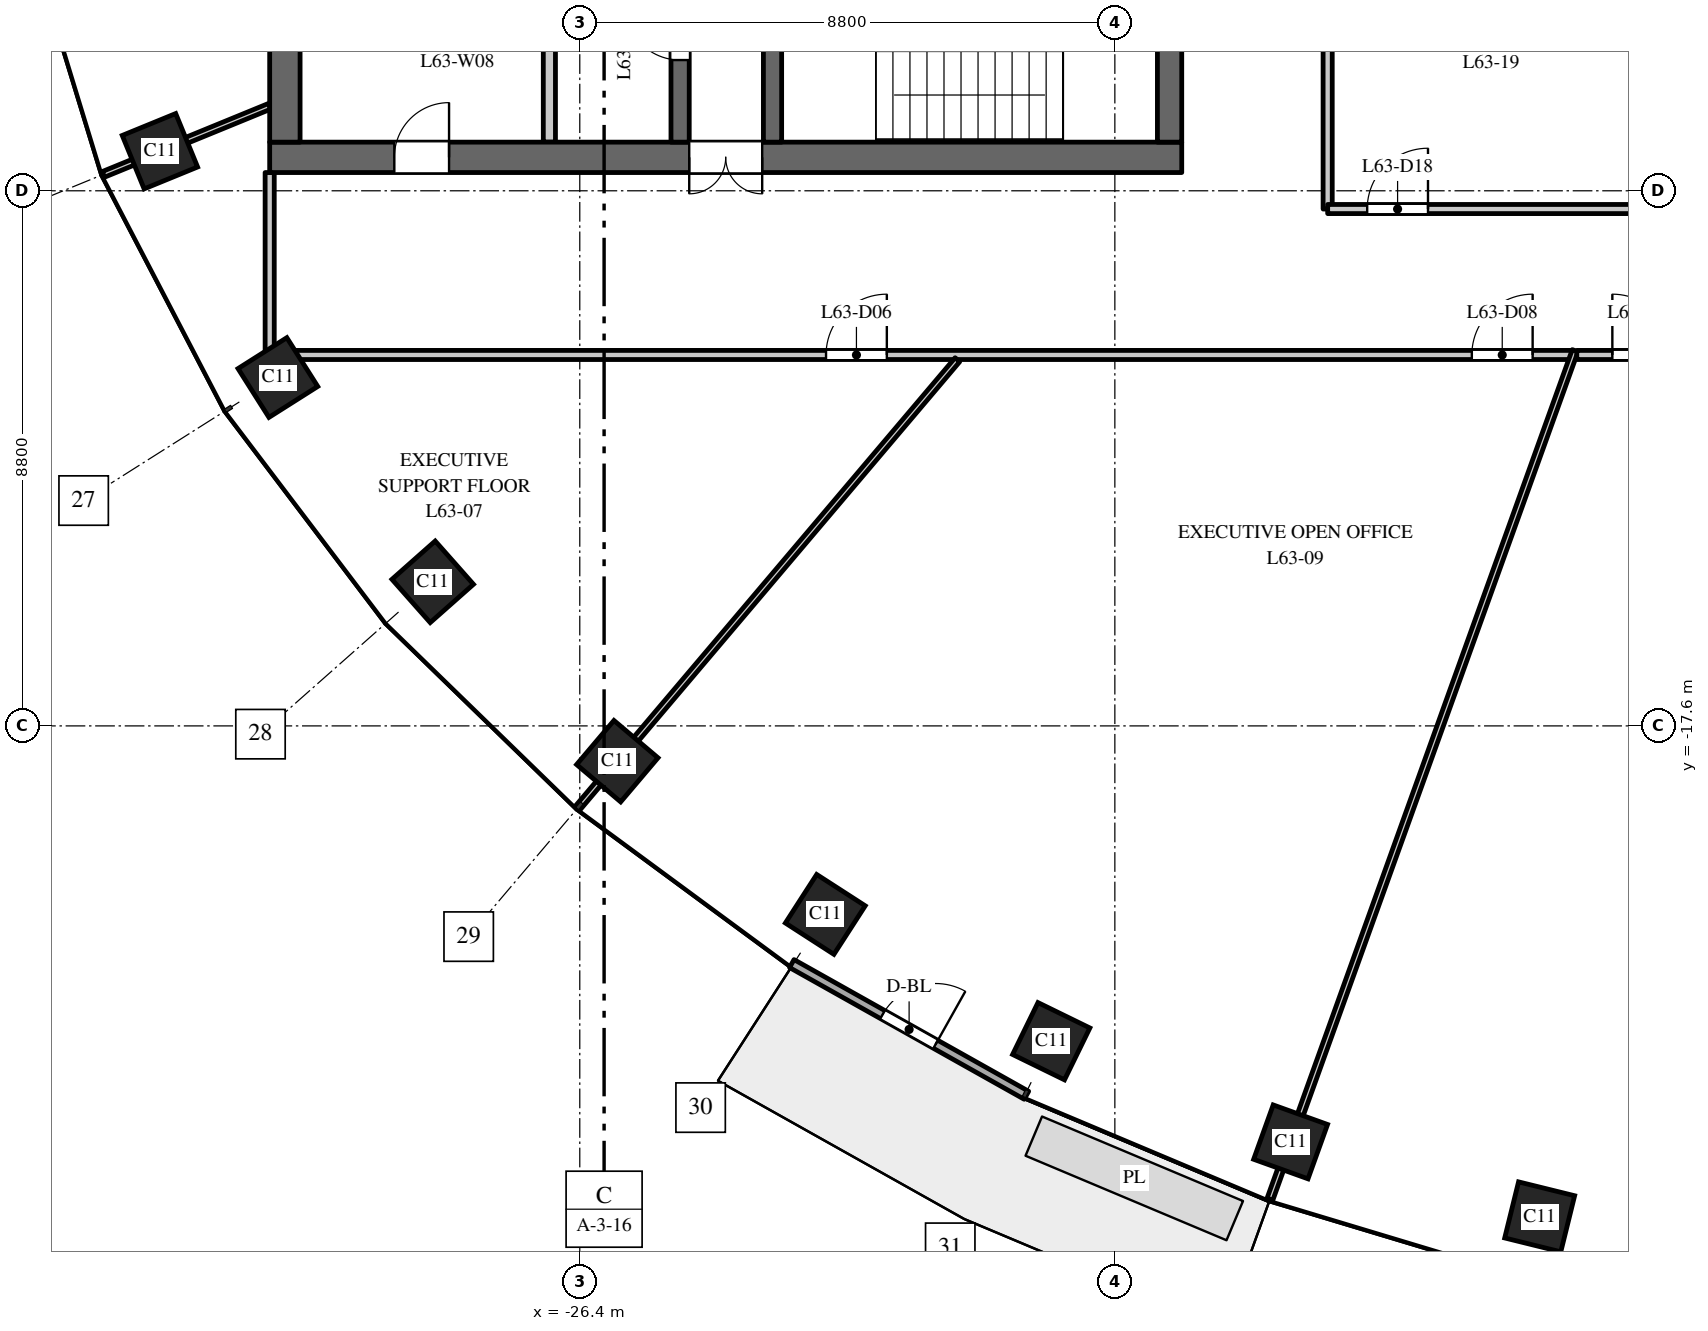
"""IFC4 building model, lengths in metres.
Left out: names, types, materials, properties, quantities, classifications, styles, units other than length and angle.
Written with IfcOpenShell. Run it as: python <this file> out.ifc"""

import sys

from ifc_helpers import new_model, si_unit, direction, frame, frame_2d, origin, origin_2d, place, context, subcontext, project, spatial, rectangle, extrude, element, fill, save


model = new_model("IFC4")
c1 = context("Model", 3, precision=1e-05, world=origin(), true_north=direction((0.0, 1.0)))
c2 = subcontext(c1, "Body", "Model", "MODEL_VIEW")
j1 = project(units=[si_unit("LENGTHUNIT", "METRE"), si_unit("PLANEANGLEUNIT", "RADIAN")], contexts=[c1])
p1 = place(None, origin())
s1 = spatial("IfcSite", under=j1, at=p1, CompositionType="ELEMENT")
p2 = place(p1, origin())
s2 = spatial("IfcBuilding", under=s1, at=p2, CompositionType="ELEMENT")
p3 = place(p2, frame((0.0, 0.0, 295.0)))
s3 = spatial("IfcBuildingStorey", under=s2, at=p3, CompositionType="ELEMENT", Elevation=295.0)
for number, where, z_axis, x_axis in (
    (1, (-33.305, -8.149, 0.0), (0.0, 0.0, 1.0), (0.379, -0.925, 0.0)),
    (2, (-31.365, -11.871, 0.0), (0.0, 0.0, 1.0), (0.535, -0.845, 0.0)),
    (3, (-28.819, -15.23, 0.0), (0.0, 0.0, 1.0), (0.663, -0.749, 0.0)),
    (4, (-25.783, -18.18, 0.0), (0.0, 0.0, 1.0), (0.763, -0.646, 0.0)),
    (5, (-22.362, -20.7, 0.0), (0.0, 0.0, 1.0), (0.84, -0.542, 0.0)),
    (6, (-18.646, -22.785, 0.0), (0.0, 0.0, 1.0), (0.898, -0.439, 0.0)),
    (7, (-14.709, -24.441, 0.0), (0.0, 0.0, 1.0), (0.941, -0.338, 0.0)),
    (8, (-10.613, -25.674, 0.0), (0.0, 0.0, 1.0), (0.971, -0.24, 0.0)),
):
    element("IfcColumn", number, at=place(p3, frame(where, z_axis=z_axis, x_axis=x_axis)), inside=s3, PredefinedType="COLUMN", context=c2, shape_type="SweptSolid", body=[
        extrude(rectangle(XDim=0.95, YDim=0.95, at=origin_2d()), origin(), (0.0, 0.0, 1.0), 4.0),
    ])
p4 = place(p3, frame((-16.5, -8.25, 0.0), z_axis=(0.0, 0.0, 1.0), x_axis=(-1.0, 0.0, 0.0)))
e9 = element("IfcWall", 9, at=p4, inside=s3, PredefinedType="SHEAR", context=c2, shape_type="SweptSolid", body=[
    extrude(rectangle(XDim=15.0, YDim=0.5, at=frame_2d((7.5, 0.0))), origin(), (0.0, 0.0, 1.0), 3.7),
])
p5 = place(p4, frame((6.9, 0.0, 0.0)))
e10 = element("IfcOpeningElement", 10, at=p5, cuts=e9, PredefinedType="OPENING", context=c2, shape_type="SweptSolid", body=[
    extrude(rectangle(XDim=1.2, YDim=2.1, at=frame_2d((0.6, 1.05))), frame((0.0, 0.26, 0.0), z_axis=(0.0, -1.0, 0.0), x_axis=(1.0, 0.0, 0.0)), (0.0, 0.0, 1.0), 0.52),
])
p6 = place(p4, frame((12.05, 0.0, 0.0)))
e11 = element("IfcOpeningElement", 11, at=p6, cuts=e9, PredefinedType="OPENING", context=c2, shape_type="SweptSolid", body=[
    extrude(rectangle(XDim=0.9, YDim=2.1, at=frame_2d((0.45, 1.05))), frame((0.0, 0.26, 0.0), z_axis=(0.0, -1.0, 0.0), x_axis=(1.0, 0.0, 0.0)), (0.0, 0.0, 1.0), 0.52),
])
p7 = place(p3, frame((-24.75, -8.0, 0.0), z_axis=(0.0, 0.0, 1.0), x_axis=(0.0, 1.0, 0.0)))
e12 = element("IfcWall", 12, at=p7, inside=s3, PredefinedType="SHEAR", context=c2, shape_type="SweptSolid", body=[
    extrude(rectangle(XDim=16.0, YDim=0.3, at=frame_2d((8.0, 0.0))), origin(), (0.0, 0.0, 1.0), 3.7),
])
p8 = place(p7, frame((4.425, 0.0, 0.0)))
e13 = element("IfcOpeningElement", 13, at=p8, cuts=e12, PredefinedType="OPENING", context=c2, shape_type="SweptSolid", body=[
    extrude(rectangle(XDim=1.1, YDim=2.1, at=frame_2d((0.55, 1.05))), frame((0.0, 0.16, 0.0), z_axis=(0.0, -1.0, 0.0), x_axis=(1.0, 0.0, 0.0)), (0.0, 0.0, 1.0), 0.32),
])
p9 = place(p7, frame((7.45, 0.0, 0.0)))
e14 = element("IfcOpeningElement", 14, at=p9, cuts=e12, PredefinedType="OPENING", context=c2, shape_type="SweptSolid", body=[
    extrude(rectangle(XDim=1.1, YDim=2.1, at=frame_2d((0.55, 1.05))), frame((0.0, 0.16, 0.0), z_axis=(0.0, -1.0, 0.0), x_axis=(1.0, 0.0, 0.0)), (0.0, 0.0, 1.0), 0.32),
])
p10 = place(p7, frame((10.575, 0.0, 0.0)))
e15 = element("IfcOpeningElement", 15, at=p10, cuts=e12, PredefinedType="OPENING", context=c2, shape_type="SweptSolid", body=[
    extrude(rectangle(XDim=0.9, YDim=2.1, at=frame_2d((0.45, 1.05))), frame((0.0, 0.16, 0.0), z_axis=(0.0, -1.0, 0.0), x_axis=(1.0, 0.0, 0.0)), (0.0, 0.0, 1.0), 0.32),
])
p11 = place(p7, frame((13.75, 0.0, 0.0)))
e16 = element("IfcOpeningElement", 16, at=p11, cuts=e12, PredefinedType="OPENING", context=c2, shape_type="SweptSolid", body=[
    extrude(rectangle(XDim=0.9, YDim=2.1, at=frame_2d((0.45, 1.05))), frame((0.0, 0.16, 0.0), z_axis=(0.0, -1.0, 0.0), x_axis=(1.0, 0.0, 0.0)), (0.0, 0.0, 1.0), 0.32),
])
p12 = place(p7, frame((1.35, 0.0, 0.0)))
e17 = element("IfcOpeningElement", 17, at=p12, cuts=e12, PredefinedType="OPENING", context=c2, shape_type="SweptSolid", body=[
    extrude(rectangle(XDim=0.9, YDim=2.1, at=frame_2d((0.45, 1.05))), frame((0.0, 0.16, 0.0), z_axis=(0.0, -1.0, 0.0), x_axis=(1.0, 0.0, 0.0)), (0.0, 0.0, 1.0), 0.32),
])
p13 = place(p3, frame((-16.7, -8.0, 0.0), z_axis=(0.0, 0.0, 1.0), x_axis=(0.0, 1.0, 0.0)))
e18 = element("IfcWall", 18, at=p13, inside=s3, PredefinedType="SHEAR", context=c2, shape_type="SweptSolid", body=[
    extrude(rectangle(XDim=16.0, YDim=0.4, at=frame_2d((8.0, 0.0))), origin(), (0.0, 0.0, 1.0), 3.7),
])
p14 = place(p3, frame((-31.25, -8.0, 0.0), z_axis=(0.0, 0.0, 1.0), x_axis=(0.0, 1.0, 0.0)))
e19 = element("IfcWall", 19, at=p14, inside=s3, PredefinedType="SHEAR", context=c2, shape_type="SweptSolid", body=[
    extrude(rectangle(XDim=16.0, YDim=0.5, at=frame_2d((8.0, 0.0))), origin(), (0.0, 0.0, 1.0), 3.7),
])
p15 = place(p3, frame((-26.9, -8.0, 0.0), z_axis=(0.0, 0.0, 1.0), x_axis=(0.0, 1.0, 0.0)))
e20 = element("IfcWall", 20, at=p15, inside=s3, PredefinedType="PARTITIONING", context=c2, shape_type="SweptSolid", body=[
    extrude(rectangle(XDim=3.25, YDim=0.2, at=frame_2d((1.625, 0.0))), origin(), (0.0, 0.0, 1.0), 3.7),
])
p16 = place(p3, frame((-23.23, -8.0, 0.0), z_axis=(0.0, 0.0, 1.0), x_axis=(0.0, 1.0, 0.0)))
e21 = element("IfcWall", 21, at=p16, inside=s3, PredefinedType="SHEAR", context=c2, shape_type="SweptSolid", body=[
    extrude(rectangle(XDim=7.875, YDim=0.3, at=frame_2d((3.938, 0.0))), origin(), (0.0, 0.0, 1.0), 3.7),
])
p17 = place(p16, frame((5.15, 0.0, 0.0)))
e22 = element("IfcOpeningElement", 22, at=p17, cuts=e21, PredefinedType="OPENING", context=c2, shape_type="SweptSolid", body=[
    extrude(rectangle(XDim=1.1, YDim=2.1, at=frame_2d((0.55, 1.05))), frame((0.0, 0.16, 0.0), z_axis=(0.0, -1.0, 0.0), x_axis=(1.0, 0.0, 0.0)), (0.0, 0.0, 1.0), 0.32),
])
p18 = place(p3, frame((-22.913, -21.509, 0.0), z_axis=(0.0, 0.0, 1.0), x_axis=(0.872046572975, -0.489422899509, 0.0)))
e23 = element("IfcWall", 23, at=p18, inside=s3, PredefinedType="STANDARD", context=c2, shape_type="SweptSolid", body=[
    extrude(rectangle(XDim=4.426, YDim=0.15, at=frame_2d((2.213, 0.0))), origin(), (0.0, 0.0, 1.0), 3.7),
])
p19 = place(p18, frame((1.713, 0.0, 0.0)))
e24 = element("IfcOpeningElement", 24, at=p19, cuts=e23, PredefinedType="OPENING", context=c2, shape_type="SweptSolid", body=[
    extrude(rectangle(XDim=1.0, YDim=2.4, at=frame_2d((0.5, 1.2))), frame((0.0, 0.085, 0.0), z_axis=(0.0, -1.0, 0.0), x_axis=(1.0, 0.0, 0.0)), (0.0, 0.0, 1.0), 0.17),
])
p20 = place(p3, frame((-34.234, -8.53, 0.0), z_axis=(0.0, 0.0, 1.0), x_axis=(0.925344112436, 0.379128307542, 0.0)))
e25 = element("IfcWall", 25, at=p20, inside=s3, PredefinedType="PARTITIONING", context=c2, shape_type="SweptSolid", body=[
    extrude(rectangle(XDim=2.954, YDim=0.1, at=frame_2d((1.477, 0.0))), origin(), (0.0, 0.0, 1.0), 3.0),
])
p21 = place(p3, frame((-31.5, -11.5, 0.0), z_axis=(0.0, 0.0, 1.0), x_axis=(0.0, 1.0, 0.0)))
e26 = element("IfcWall", 26, at=p21, inside=s3, PredefinedType="PARTITIONING", context=c2, shape_type="SweptSolid", body=[
    extrude(rectangle(XDim=3.0, YDim=0.15, at=frame_2d((1.5, 0.0))), origin(), (0.0, 0.0, 1.0), 3.0),
])
p22 = place(p3, frame((-31.5, -11.5, 0.0), z_axis=(0.0, 0.0, 1.0), x_axis=(1.0, 0.0, 0.0)))
e27 = element("IfcWall", 27, at=p22, inside=s3, PredefinedType="PARTITIONING", context=c2, shape_type="SweptSolid", body=[
    extrude(rectangle(XDim=21.432, YDim=0.15, at=frame_2d((10.716, 0.0))), origin(), (0.0, 0.0, 1.0), 2.75),
])
p23 = place(p22, frame((9.15, 0.0, 0.0)))
e28 = element("IfcOpeningElement", 28, at=p23, cuts=e27, PredefinedType="OPENING", context=c2, shape_type="SweptSolid", body=[
    extrude(rectangle(XDim=1.0, YDim=2.1, at=frame_2d((0.5, 1.05))), frame((0.0, 0.085, 0.0), z_axis=(0.0, -1.0, 0.0), x_axis=(1.0, 0.0, 0.0)), (0.0, 0.0, 1.0), 0.17),
])
p24 = place(p22, frame((19.771, 0.0, 0.0)))
e29 = element("IfcOpeningElement", 29, at=p24, cuts=e27, PredefinedType="OPENING", context=c2, shape_type="SweptSolid", body=[
    extrude(rectangle(XDim=1.0, YDim=2.1, at=frame_2d((0.5, 1.05))), frame((0.0, 0.085, 0.0), z_axis=(0.0, -1.0, 0.0), x_axis=(1.0, 0.0, 0.0)), (0.0, 0.0, 1.0), 0.17),
])
p25 = place(p3, frame((-26.43, -18.945, 0.0), z_axis=(0.0, 0.0, 1.0), x_axis=(0.646376264927, 0.763018822926, 0.0)))
e30 = element("IfcWall", 30, at=p25, inside=s3, PredefinedType="PARTITIONING", context=c2, shape_type="SweptSolid", body=[
    extrude(rectangle(XDim=9.655, YDim=0.1, at=frame_2d((4.828, 0.0))), origin(), (0.0, 0.0, 1.0), 2.75),
])
p26 = place(p3, frame((-15.049, -25.383, 0.0), z_axis=(0.0, 0.0, 1.0), x_axis=(0.338454781071, 0.94098265721, 0.0)))
e31 = element("IfcWall", 31, at=p26, inside=s3, PredefinedType="PARTITIONING", context=c2, shape_type="SweptSolid", body=[
    extrude(rectangle(XDim=14.829, YDim=0.1, at=frame_2d((7.415, 0.0))), origin(), (0.0, 0.0, 1.0), 2.75),
])
p27 = place(p3, frame((-14.1, -9.1, 0.0), z_axis=(0.0, 0.0, 1.0), x_axis=(0.0, 1.0, 0.0)))
e32 = element("IfcWall", 32, at=p27, inside=s3, PredefinedType="PARTITIONING", context=c2, shape_type="SweptSolid", body=[
    extrude(rectangle(XDim=18.2, YDim=0.15, at=frame_2d((9.1, 0.0))), origin(), (0.0, 0.0, 1.0), 3.7),
])
p28 = place(p27, frame((5.655, 0.0, 0.0)))
e33 = element("IfcOpeningElement", 33, at=p28, cuts=e32, PredefinedType="OPENING", context=c2, shape_type="SweptSolid", body=[
    extrude(rectangle(XDim=1.0, YDim=2.1, at=frame_2d((0.5, 1.05))), frame((0.0, 0.085, 0.0), z_axis=(0.0, -1.0, 0.0), x_axis=(1.0, 0.0, 0.0)), (0.0, 0.0, 1.0), 0.17),
])
p29 = place(p27, frame((12.455, 0.0, 0.0)))
e34 = element("IfcOpeningElement", 34, at=p29, cuts=e32, PredefinedType="OPENING", context=c2, shape_type="SweptSolid", body=[
    extrude(rectangle(XDim=1.0, YDim=2.1, at=frame_2d((0.5, 1.05))), frame((0.0, 0.085, 0.0), z_axis=(0.0, -1.0, 0.0), x_axis=(1.0, 0.0, 0.0)), (0.0, 0.0, 1.0), 0.17),
])
p30 = place(p3, frame((-14.1, -9.1, 0.0), z_axis=(0.0, 0.0, 1.0), x_axis=(1.0, 0.0, 0.0)))
e35 = element("IfcWall", 35, at=p30, inside=s3, PredefinedType="PARTITIONING", context=c2, shape_type="SweptSolid", body=[
    extrude(rectangle(XDim=12.3, YDim=0.15, at=frame_2d((6.15, 0.0))), origin(), (0.0, 0.0, 1.0), 2.75),
])
p31 = place(p30, frame((0.65, 0.0, 0.0)))
e36 = element("IfcOpeningElement", 36, at=p31, cuts=e35, PredefinedType="OPENING", context=c2, shape_type="SweptSolid", body=[
    extrude(rectangle(XDim=1.0, YDim=2.1, at=frame_2d((0.5, 1.05))), frame((0.0, 0.085, 0.0), z_axis=(0.0, -1.0, 0.0), x_axis=(1.0, 0.0, 0.0)), (0.0, 0.0, 1.0), 0.17),
])
p32 = place(p3, frame((-10.003, -11.5, 0.0), z_axis=(0.0, 0.0, 1.0), x_axis=(1.0, 0.0, 0.0)))
e37 = element("IfcWall", 37, at=p32, inside=s3, PredefinedType="PARTITIONING", context=c2, shape_type="SweptSolid", body=[
    extrude(rectangle(XDim=9.086, YDim=0.15, at=frame_2d((4.543, 0.0))), origin(), (0.0, 0.0, 1.0), 2.75),
])
p33 = place(p32, frame((0.585, 0.0, 0.0)))
e38 = element("IfcOpeningElement", 38, at=p33, cuts=e37, PredefinedType="OPENING", context=c2, shape_type="SweptSolid", body=[
    extrude(rectangle(XDim=1.0, YDim=2.1, at=frame_2d((0.5, 1.05))), frame((0.0, 0.085, 0.0), z_axis=(0.0, -1.0, 0.0), x_axis=(1.0, 0.0, 0.0)), (0.0, 0.0, 1.0), 0.17),
])
p34 = place(p5, origin())
e39 = element("IfcDoor", 39, at=p34, inside=s3, OperationType="DOUBLE_DOOR_DOUBLE_SWING", PredefinedType="DOOR", context=c2, shape_type="SweptSolid", body=[
    extrude(rectangle(XDim=1.2, YDim=2.1, at=frame_2d((0.6, 1.05))), frame((0.0, 0.025, 0.0), z_axis=(0.0, -1.0, 0.0), x_axis=(1.0, 0.0, 0.0)), (0.0, 0.0, 1.0), 0.05),
])
fill(e10, e39)
p35 = place(p12, origin())
e40 = element("IfcDoor", 40, at=p35, inside=s3, OperationType="SINGLE_SWING_LEFT", PredefinedType="DOOR", context=c2, shape_type="SweptSolid", body=[
    extrude(rectangle(XDim=0.9, YDim=2.1, at=frame_2d((0.45, 1.05))), frame((0.0, 0.025, 0.0), z_axis=(0.0, -1.0, 0.0), x_axis=(1.0, 0.0, 0.0)), (0.0, 0.0, 1.0), 0.05),
])
fill(e17, e40)
p36 = place(p6, origin())
e41 = element("IfcDoor", 41, at=p36, inside=s3, OperationType="SINGLE_SWING_LEFT", PredefinedType="DOOR", context=c2, shape_type="SweptSolid", body=[
    extrude(rectangle(XDim=0.9, YDim=2.1, at=frame_2d((0.45, 1.05))), frame((0.0, 0.025, 0.0), z_axis=(0.0, -1.0, 0.0), x_axis=(1.0, 0.0, 0.0)), (0.0, 0.0, 1.0), 0.05),
])
fill(e11, e41)
p37 = place(p19, origin())
e42 = element("IfcDoor", 42, at=p37, inside=s3, OperationType="SINGLE_SWING_RIGHT", PredefinedType="DOOR", context=c2, shape_type="SweptSolid", body=[
    extrude(rectangle(XDim=1.0, YDim=2.4, at=frame_2d((0.5, 1.2))), frame((0.0, 0.025, 0.0), z_axis=(0.0, -1.0, 0.0), x_axis=(1.0, 0.0, 0.0)), (0.0, 0.0, 1.0), 0.05),
])
fill(e24, e42)
p38 = place(p23, origin())
e43 = element("IfcDoor", 43, at=p38, inside=s3, OperationType="SINGLE_SWING_RIGHT", PredefinedType="DOOR", context=c2, shape_type="SweptSolid", body=[
    extrude(rectangle(XDim=1.0, YDim=2.1, at=frame_2d((0.5, 1.05))), frame((0.0, 0.025, 0.0), z_axis=(0.0, -1.0, 0.0), x_axis=(1.0, 0.0, 0.0)), (0.0, 0.0, 1.0), 0.05),
])
fill(e28, e43)
p39 = place(p24, origin())
e44 = element("IfcDoor", 44, at=p39, inside=s3, OperationType="SINGLE_SWING_RIGHT", PredefinedType="DOOR", context=c2, shape_type="SweptSolid", body=[
    extrude(rectangle(XDim=1.0, YDim=2.1, at=frame_2d((0.5, 1.05))), frame((0.0, 0.025, 0.0), z_axis=(0.0, -1.0, 0.0), x_axis=(1.0, 0.0, 0.0)), (0.0, 0.0, 1.0), 0.05),
])
fill(e29, e44)
p40 = place(p33, origin())
e45 = element("IfcDoor", 45, at=p40, inside=s3, OperationType="SINGLE_SWING_LEFT", PredefinedType="DOOR", context=c2, shape_type="SweptSolid", body=[
    extrude(rectangle(XDim=1.0, YDim=2.1, at=frame_2d((0.5, 1.05))), frame((0.0, 0.025, 0.0), z_axis=(0.0, -1.0, 0.0), x_axis=(1.0, 0.0, 0.0)), (0.0, 0.0, 1.0), 0.05),
])
fill(e38, e45)
p41 = place(p31, origin())
e46 = element("IfcDoor", 46, at=p41, inside=s3, OperationType="SINGLE_SWING_RIGHT", PredefinedType="DOOR", context=c2, shape_type="SweptSolid", body=[
    extrude(rectangle(XDim=1.0, YDim=2.1, at=frame_2d((0.5, 1.05))), frame((0.0, 0.025, 0.0), z_axis=(0.0, -1.0, 0.0), x_axis=(1.0, 0.0, 0.0)), (0.0, 0.0, 1.0), 0.05),
])
fill(e36, e46)
save(model, sys.argv[1])
